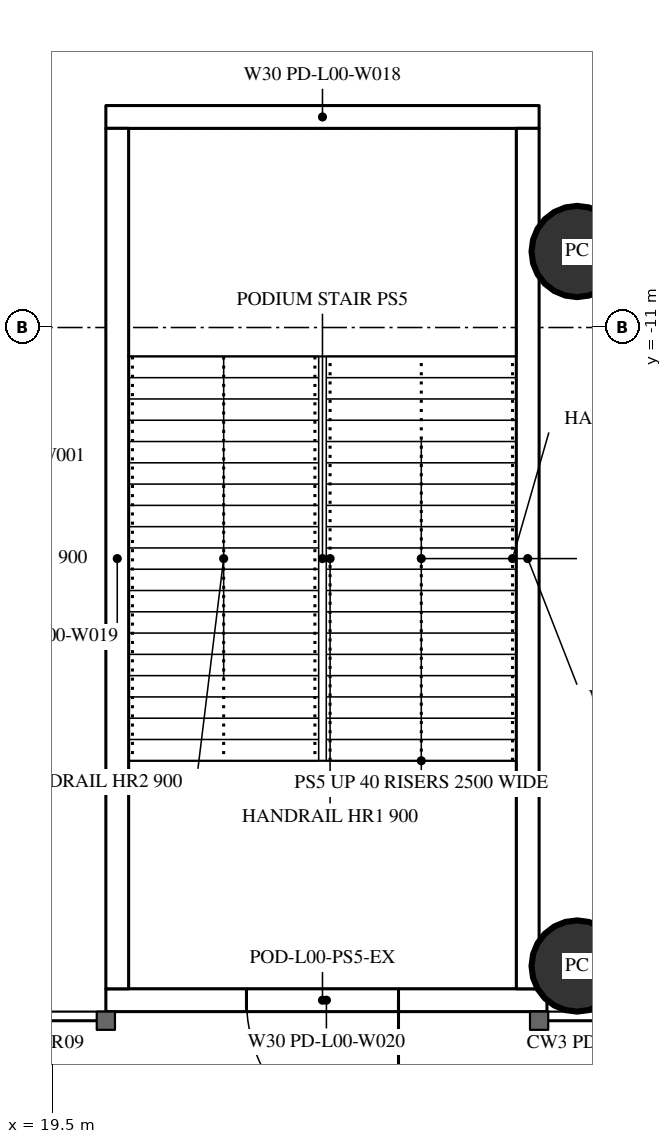
"""IFC4 building model, lengths in metres.
Left out: names, types, materials, properties, quantities, classifications, styles, units other than length and angle.
Written with IfcOpenShell. Run it as: python <this file> out.ifc"""

import sys

from ifc_helpers import new_model, si_unit, direction, frame, frame_2d, origin, origin_2d, place, context, subcontext, project, spatial, rectangle, circle, extrude, element, fill, save


model = new_model("IFC4")
c1 = context("Model", 3, precision=1e-05, world=origin(), true_north=direction((0.0, 1.0)))
c2 = subcontext(c1, "Body", "Model", "MODEL_VIEW")
j1 = project(units=[si_unit("LENGTHUNIT", "METRE"), si_unit("PLANEANGLEUNIT", "RADIAN")], contexts=[c1])
p1 = place(None, origin())
s1 = spatial("IfcSite", under=j1, at=p1, CompositionType="ELEMENT")
p2 = place(p1, origin())
s2 = spatial("IfcBuilding", under=s1, at=p2, CompositionType="ELEMENT")
p3 = place(p2, origin())
s3 = spatial("IfcBuildingStorey", under=s2, at=p3, CompositionType="ELEMENT", Elevation=0.0)
for number, where, z_axis, x_axis in (
    (1, (26.4, -19.4, 0.0), (0.0, 0.0, 1.0), (1.0, 0.0, 0.0)),
    (2, (26.4, -10.0, 0.0), (0.0, 0.0, 1.0), (1.0, 0.0, 0.0)),
):
    element("IfcColumn", number, at=place(p3, frame(where, z_axis=z_axis, x_axis=x_axis)), inside=s3, PredefinedType="COLUMN", context=c2, shape_type="SweptSolid", body=[
        extrude(circle(Radius=0.6, at=origin_2d()), origin(), (0.0, 0.0, 1.0), 7.2),
    ])
p4 = place(p3, frame((26.003, -19.85, 0.0), z_axis=(0.0, 0.0, 1.0), x_axis=(-1.0, 0.0, 0.0)))
e3 = element("IfcWall", 3, at=p4, inside=s3, PredefinedType="SOLIDWALL", context=c2, shape_type="SweptSolid", body=[
    extrude(rectangle(XDim=5.803, YDim=0.3, at=frame_2d((2.902, 0.0))), origin(), (0.0, 0.0, 1.0), 5.95),
])
p5 = place(p4, frame((1.953, 0.0, 0.0)))
e4 = element("IfcOpeningElement", 4, at=p5, cuts=e3, PredefinedType="OPENING", context=c2, shape_type="SweptSolid", body=[
    extrude(rectangle(XDim=2.0, YDim=2.2, at=frame_2d((1.0, 1.1))), frame((0.0, 0.16, 0.0), z_axis=(0.0, -1.0, 0.0), x_axis=(1.0, 0.0, 0.0)), (0.0, 0.0, 1.0), 0.32),
])
p6 = place(p3, frame((20.2, -8.23, 0.0), z_axis=(0.0, 0.0, 1.0), x_axis=(1.0, 0.0, 0.0)))
e5 = element("IfcWall", 5, at=p6, inside=s3, PredefinedType="SOLIDWALL", context=c2, shape_type="SweptSolid", body=[
    extrude(rectangle(XDim=5.7, YDim=0.3, at=frame_2d((2.85, 0.0))), origin(), (0.0, 0.0, 1.0), 6.85),
])
for number, where, z_axis, x_axis in (
    (6, (20.35, -8.38, 0.0), (0.0, 0.0, 1.0), (0.0, -1.0, 0.0)),
    (7, (25.75, -8.38, 0.0), (0.0, 0.0, 1.0), (0.0, -1.0, 0.0)),
):
    element("IfcWall", number, at=place(p3, frame(where, z_axis=z_axis, x_axis=x_axis)), inside=s3, PredefinedType="SOLIDWALL", context=c2, shape_type="SweptSolid", body=[
        extrude(rectangle(XDim=11.32, YDim=0.3, at=frame_2d((5.66, 0.0))), origin(), (0.0, 0.0, 1.0), 6.85),
    ])
p7 = place(p5, origin())
e8 = element("IfcDoor", 8, at=p7, inside=s3, OperationType="DOUBLE_DOOR_SINGLE_SWING", PredefinedType="DOOR", context=c2, shape_type="SweptSolid", body=[
    extrude(rectangle(XDim=2.0, YDim=2.2, at=frame_2d((1.0, 1.1))), frame((0.0, 0.025, 0.0), z_axis=(0.0, -1.0, 0.0), x_axis=(1.0, 0.0, 0.0)), (0.0, 0.0, 1.0), 0.05),
])
fill(e4, e8)
save(model, sys.argv[1])
